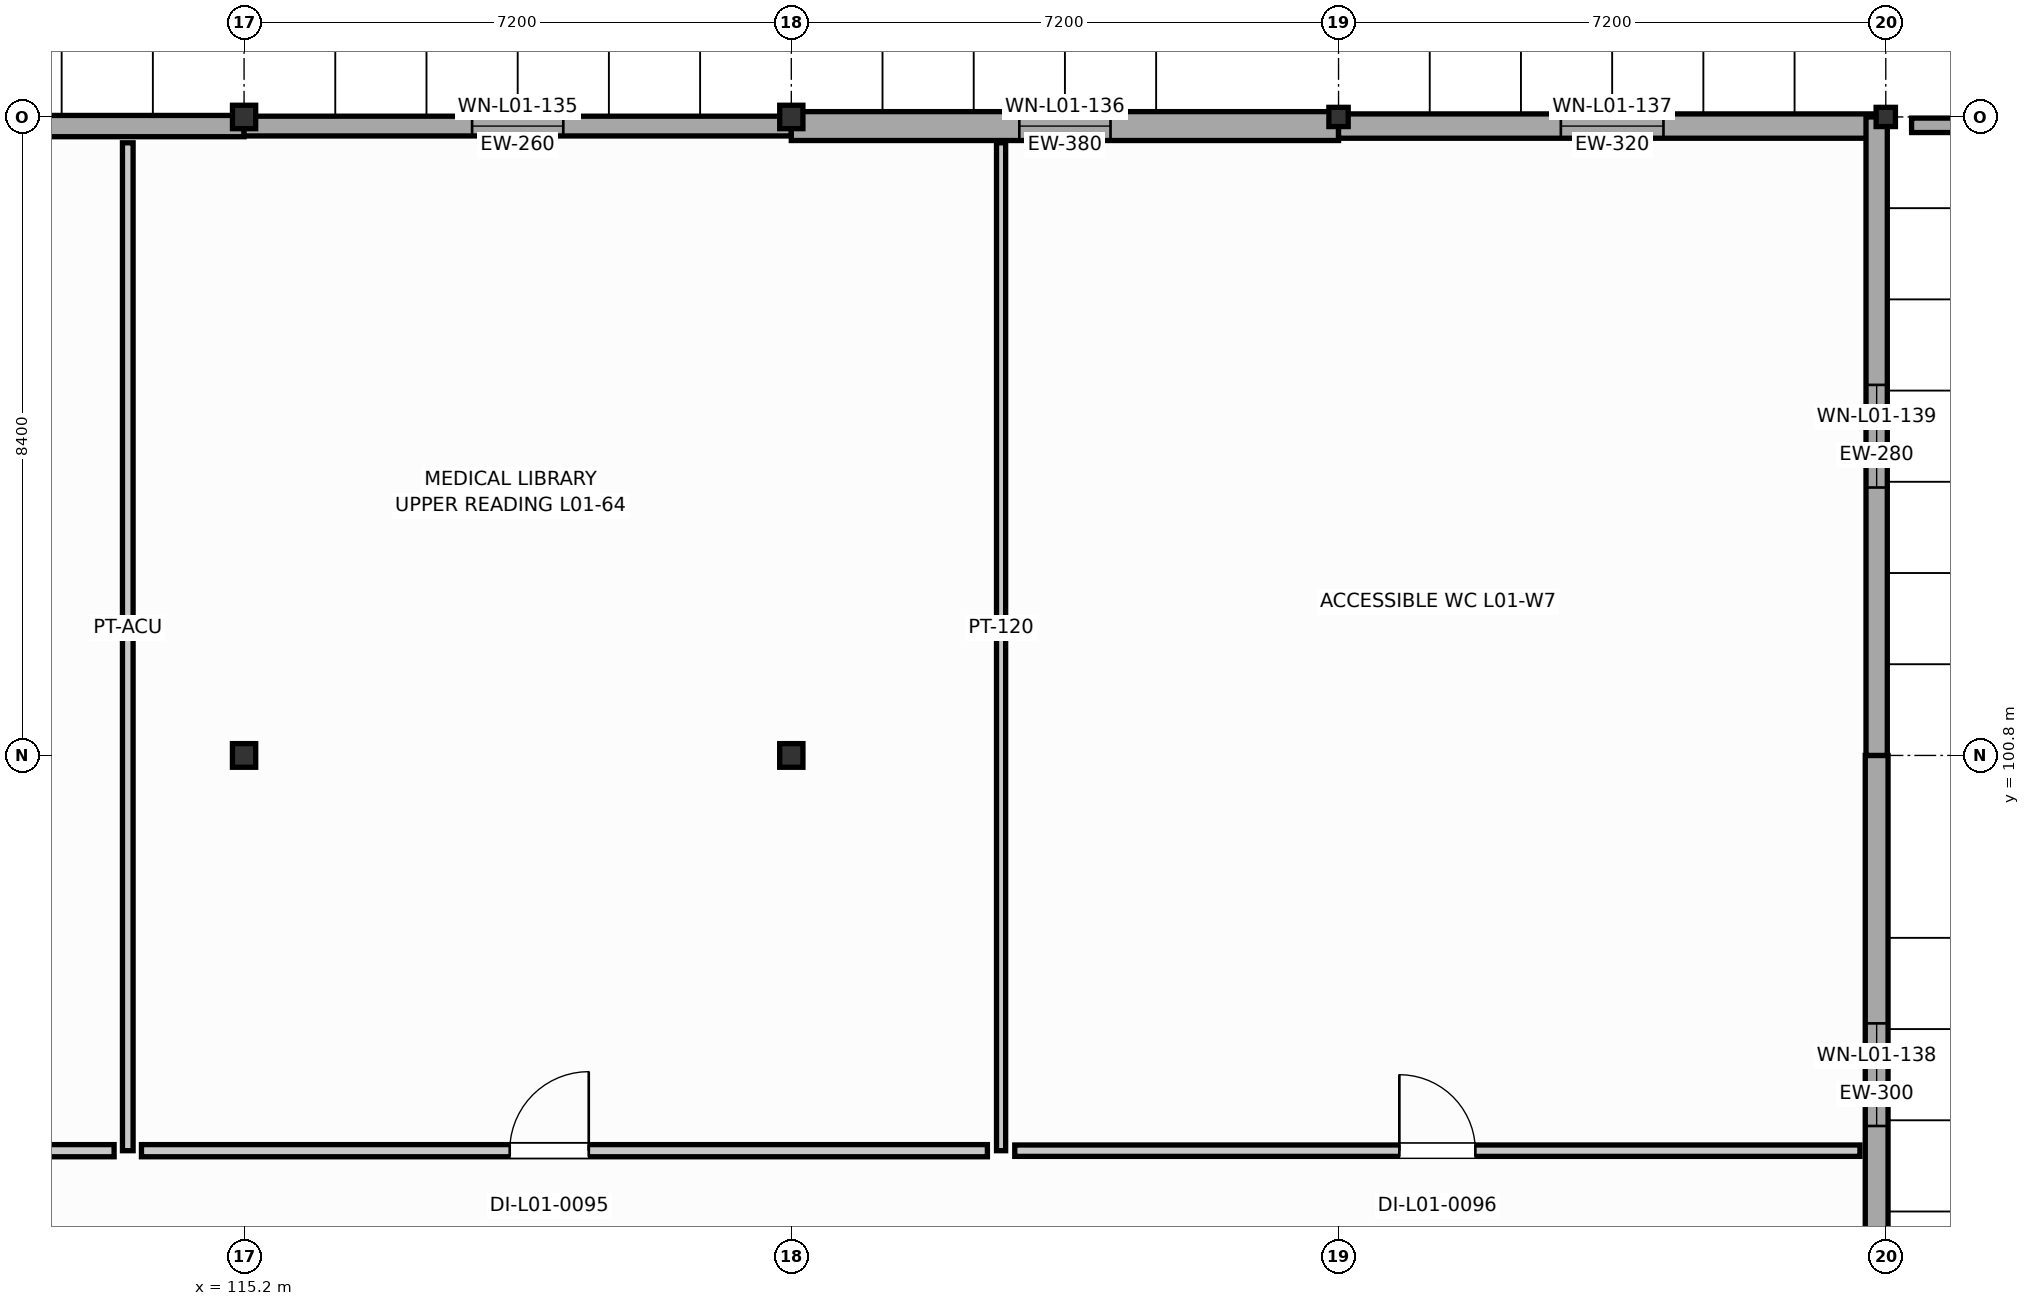
"""IFC4 building model, lengths in metres.
Left out: names, types, materials, properties, quantities, classifications, styles, units other than length and angle.
Written with IfcOpenShell. Run it as: python <this file> out.ifc"""

import sys

from ifc_helpers import new_model, si_unit, direction, frame, frame_2d, origin, origin_2d, place, context, subcontext, project, spatial, rectangle, i_section, extrude, element, fill, save


model = new_model("IFC4")
c1 = context("Model", 3, precision=1e-05, world=origin(), true_north=direction((0.0, 1.0)))
c2 = subcontext(c1, "Body", "Model", "MODEL_VIEW")
j1 = project(units=[si_unit("LENGTHUNIT", "METRE"), si_unit("PLANEANGLEUNIT", "RADIAN")], contexts=[c1])
p1 = place(None, origin())
s1 = spatial("IfcSite", under=j1, at=p1, CompositionType="ELEMENT")
p2 = place(p1, origin())
s2 = spatial("IfcBuilding", under=s1, at=p2, CompositionType="ELEMENT")
p3 = place(p2, frame((0.0, 0.0, 4.8)))
s3 = spatial("IfcBuildingStorey", under=s2, at=p3, CompositionType="ELEMENT", Elevation=4.8)
p4 = place(p3, frame((115.2, 100.8, 0.0), z_axis=(0.0, 0.0, 1.0), x_axis=(1.0, 0.0, 0.0)))
e1 = element("IfcColumn", 1, at=p4, inside=s3, PredefinedType="COLUMN", context=c2, shape_type="SweptSolid", body=[
    extrude(i_section(OverallWidth=0.306, OverallDepth=0.311, WebThickness=0.011, FlangeThickness=0.017, FilletRadius=0.015, at=origin_2d()), origin(), (0.0, 0.0, 1.0), 4.2),
])
p5 = place(p3, frame((115.2, 109.2, 0.0), z_axis=(0.0, 0.0, 1.0), x_axis=(1.0, 0.0, 0.0)))
e2 = element("IfcColumn", 2, at=p5, inside=s3, PredefinedType="COLUMN", context=c2, shape_type="SweptSolid", body=[
    extrude(i_section(OverallWidth=0.305, OverallDepth=0.308, WebThickness=0.01, FlangeThickness=0.015, FilletRadius=0.015, at=origin_2d()), origin(), (0.0, 0.0, 1.0), 4.2),
])
p6 = place(p3, frame((122.4, 100.8, 0.0), z_axis=(0.0, 0.0, 1.0), x_axis=(1.0, 0.0, 0.0)))
e3 = element("IfcColumn", 3, at=p6, inside=s3, PredefinedType="COLUMN", context=c2, shape_type="SweptSolid", body=[
    extrude(i_section(OverallWidth=0.306, OverallDepth=0.311, WebThickness=0.011, FlangeThickness=0.017, FilletRadius=0.015, at=origin_2d()), origin(), (0.0, 0.0, 1.0), 4.2),
])
p7 = place(p3, frame((122.4, 109.2, 0.0), z_axis=(0.0, 0.0, 1.0), x_axis=(1.0, 0.0, 0.0)))
e4 = element("IfcColumn", 4, at=p7, inside=s3, PredefinedType="COLUMN", context=c2, shape_type="SweptSolid", body=[
    extrude(i_section(OverallWidth=0.305, OverallDepth=0.308, WebThickness=0.01, FlangeThickness=0.015, FilletRadius=0.015, at=origin_2d()), origin(), (0.0, 0.0, 1.0), 4.2),
])
for number, where, z_axis, x_axis in (
    (5, (129.6, 109.2, 0.0), (0.0, 0.0, 1.0), (1.0, 0.0, 0.0)),
    (6, (136.8, 109.2, 0.0), (0.0, 0.0, 1.0), (1.0, 0.0, 0.0)),
):
    element("IfcColumn", number, at=place(p3, frame(where, z_axis=z_axis, x_axis=x_axis)), inside=s3, PredefinedType="COLUMN", context=c2, shape_type="SweptSolid", body=[
        extrude(i_section(OverallWidth=0.254, OverallDepth=0.253, WebThickness=0.009, FlangeThickness=0.014, FilletRadius=0.013, at=origin_2d()), origin(), (0.0, 0.0, 1.0), 4.2),
    ])
p8 = place(p3, frame((108.0, 109.08, 0.0), z_axis=(0.0, 0.0, 1.0), x_axis=(1.0, 0.0, 0.0)))
e7 = element("IfcWall", 7, at=p8, inside=s3, PredefinedType="SOLIDWALL", context=c2, shape_type="SweptSolid", body=[
    extrude(rectangle(XDim=7.2, YDim=0.28, at=frame_2d((3.6, 0.0))), origin(), (0.0, 0.0, 1.0), 3.482),
])
p9 = place(p8, frame((3.0, 0.0, 0.95)))
e8 = element("IfcOpeningElement", 8, at=p9, cuts=e7, PredefinedType="OPENING", context=c2, shape_type="SweptSolid", body=[
    extrude(rectangle(XDim=1.2, YDim=1.35, at=frame_2d((0.6, 0.675))), frame((0.0, 0.15, 0.0), z_axis=(0.0, -1.0, 0.0), x_axis=(1.0, 0.0, 0.0)), (0.0, 0.0, 1.0), 0.3),
])
p10 = place(p3, frame((115.2, 109.08, 0.0), z_axis=(0.0, 0.0, 1.0), x_axis=(1.0, 0.0, 0.0)))
e9 = element("IfcWall", 9, at=p10, inside=s3, PredefinedType="SOLIDWALL", context=c2, shape_type="SweptSolid", body=[
    extrude(rectangle(XDim=7.2, YDim=0.26, at=frame_2d((3.6, 0.0))), origin(), (0.0, 0.0, 1.0), 3.482),
])
p11 = place(p10, frame((3.0, 0.0, 0.95)))
e10 = element("IfcOpeningElement", 10, at=p11, cuts=e9, PredefinedType="OPENING", context=c2, shape_type="SweptSolid", body=[
    extrude(rectangle(XDim=1.2, YDim=1.55, at=frame_2d((0.6, 0.775))), frame((0.0, 0.14, 0.0), z_axis=(0.0, -1.0, 0.0), x_axis=(1.0, 0.0, 0.0)), (0.0, 0.0, 1.0), 0.28),
])
p12 = place(p3, frame((122.4, 109.08, 0.0), z_axis=(0.0, 0.0, 1.0), x_axis=(1.0, 0.0, 0.0)))
e11 = element("IfcWall", 11, at=p12, inside=s3, PredefinedType="SOLIDWALL", context=c2, shape_type="SweptSolid", body=[
    extrude(rectangle(XDim=7.2, YDim=0.38, at=frame_2d((3.6, 0.0))), origin(), (0.0, 0.0, 1.0), 3.482),
])
p13 = place(p12, frame((3.0, 0.0, 0.95)))
e12 = element("IfcOpeningElement", 12, at=p13, cuts=e11, PredefinedType="OPENING", context=c2, shape_type="SweptSolid", body=[
    extrude(rectangle(XDim=1.2, YDim=1.75, at=frame_2d((0.6, 0.875))), frame((0.0, 0.2, 0.0), z_axis=(0.0, -1.0, 0.0), x_axis=(1.0, 0.0, 0.0)), (0.0, 0.0, 1.0), 0.4),
])
p14 = place(p3, frame((129.6, 109.08, 0.0), z_axis=(0.0, 0.0, 1.0), x_axis=(1.0, 0.0, 0.0)))
e13 = element("IfcWall", 13, at=p14, inside=s3, PredefinedType="SOLIDWALL", context=c2, shape_type="SweptSolid", body=[
    extrude(rectangle(XDim=7.2, YDim=0.32, at=frame_2d((3.6, 0.0))), origin(), (0.0, 0.0, 1.0), 3.482),
])
p15 = place(p14, frame((2.925, 0.0, 0.95)))
e14 = element("IfcOpeningElement", 14, at=p15, cuts=e13, PredefinedType="OPENING", context=c2, shape_type="SweptSolid", body=[
    extrude(rectangle(XDim=1.35, YDim=1.15, at=frame_2d((0.675, 0.575))), frame((0.0, 0.17, 0.0), z_axis=(0.0, -1.0, 0.0), x_axis=(1.0, 0.0, 0.0)), (0.0, 0.0, 1.0), 0.34),
])
p16 = place(p3, frame((136.68, 92.4, 0.0), z_axis=(0.0, 0.0, 1.0), x_axis=(0.0, 1.0, 0.0)))
e15 = element("IfcWall", 15, at=p16, inside=s3, PredefinedType="SOLIDWALL", context=c2, shape_type="SweptSolid", body=[
    extrude(rectangle(XDim=8.4, YDim=0.3, at=frame_2d((4.2, 0.0))), origin(), (0.0, 0.0, 1.0), 3.015),
])
p17 = place(p16, frame((3.525, 0.0, 0.95)))
e16 = element("IfcOpeningElement", 16, at=p17, cuts=e15, PredefinedType="OPENING", context=c2, shape_type="SweptSolid", body=[
    extrude(rectangle(XDim=1.35, YDim=1.35, at=frame_2d((0.675, 0.675))), frame((0.0, 0.16, 0.0), z_axis=(0.0, -1.0, 0.0), x_axis=(1.0, 0.0, 0.0)), (0.0, 0.0, 1.0), 0.32),
])
p18 = place(p3, frame((136.68, 100.8, 0.0), z_axis=(0.0, 0.0, 1.0), x_axis=(0.0, 1.0, 0.0)))
e17 = element("IfcWall", 17, at=p18, inside=s3, PredefinedType="SOLIDWALL", context=c2, shape_type="SweptSolid", body=[
    extrude(rectangle(XDim=8.4, YDim=0.28, at=frame_2d((4.2, 0.0))), origin(), (0.0, 0.0, 1.0), 3.015),
])
p19 = place(p18, frame((3.525, 0.0, 0.95)))
e18 = element("IfcOpeningElement", 18, at=p19, cuts=e17, PredefinedType="OPENING", context=c2, shape_type="SweptSolid", body=[
    extrude(rectangle(XDim=1.35, YDim=1.55, at=frame_2d((0.675, 0.775))), frame((0.0, 0.15, 0.0), z_axis=(0.0, -1.0, 0.0), x_axis=(1.0, 0.0, 0.0)), (0.0, 0.0, 1.0), 0.3),
])
p20 = place(p3, frame((137.139, 109.09, 0.0), z_axis=(0.0, 0.0, 1.0), x_axis=(1.0, 0.0, 0.0)))
e19 = element("IfcWall", 19, at=p20, inside=s3, PredefinedType="PARAPET", context=c2, shape_type="SweptSolid", body=[
    extrude(rectangle(XDim=6.583, YDim=0.19, at=frame_2d((3.292, 0.0))), origin(), (0.0, 0.0, 1.0), 1.15),
])
p21 = place(p3, frame((113.67, 108.86, 0.0), z_axis=(0.0, 0.0, 1.0), x_axis=(0.0, -1.0, 0.0)))
e20 = element("IfcWall", 20, at=p21, inside=s3, PredefinedType="PARTITIONING", context=c2, shape_type="SweptSolid", body=[
    extrude(rectangle(XDim=13.26, YDim=0.14, at=frame_2d((6.63, 0.0))), origin(), (0.0, 0.0, 1.0), 3.328),
])
p22 = place(p3, frame((113.49, 95.6, 0.0), z_axis=(0.0, 0.0, 1.0), x_axis=(-1.0, 0.0, 0.0)))
e21 = element("IfcWall", 21, at=p22, inside=s3, PredefinedType="PARTITIONING", context=c2, shape_type="SweptSolid", body=[
    extrude(rectangle(XDim=11.13, YDim=0.16, at=frame_2d((5.565, 0.0))), origin(), (0.0, 0.0, 1.0), 3.328),
])
p23 = place(p22, frame((5.225, 0.0, 0.0)))
e22 = element("IfcOpeningElement", 22, at=p23, cuts=e21, PredefinedType="OPENING", context=c2, shape_type="SweptSolid", body=[
    extrude(rectangle(XDim=1.08, YDim=2.15, at=frame_2d((0.54, 1.075))), frame((0.0, 0.09, 0.0), z_axis=(0.0, -1.0, 0.0), x_axis=(1.0, 0.0, 0.0)), (0.0, 0.0, 1.0), 0.18),
])
p24 = place(p3, frame((125.16, 108.86, 0.0), z_axis=(0.0, 0.0, 1.0), x_axis=(0.0, -1.0, 0.0)))
e23 = element("IfcWall", 23, at=p24, inside=s3, PredefinedType="PARTITIONING", context=c2, shape_type="SweptSolid", body=[
    extrude(rectangle(XDim=13.26, YDim=0.12, at=frame_2d((6.63, 0.0))), origin(), (0.0, 0.0, 1.0), 3.945),
])
p25 = place(p3, frame((124.98, 95.6, 0.0), z_axis=(0.0, 0.0, 1.0), x_axis=(-1.0, 0.0, 0.0)))
e24 = element("IfcWall", 24, at=p25, inside=s3, PredefinedType="PARTITIONING", context=c2, shape_type="SweptSolid", body=[
    extrude(rectangle(XDim=11.13, YDim=0.16, at=frame_2d((5.565, 0.0))), origin(), (0.0, 0.0, 1.0), 3.408),
])
p26 = place(p25, frame((5.245, 0.0, 0.0)))
e25 = element("IfcOpeningElement", 25, at=p26, cuts=e24, PredefinedType="OPENING", context=c2, shape_type="SweptSolid", body=[
    extrude(rectangle(XDim=1.04, YDim=2.15, at=frame_2d((0.52, 1.075))), frame((0.0, 0.09, 0.0), z_axis=(0.0, -1.0, 0.0), x_axis=(1.0, 0.0, 0.0)), (0.0, 0.0, 1.0), 0.18),
])
p27 = place(p3, frame((136.46, 95.6, 0.0), z_axis=(0.0, 0.0, 1.0), x_axis=(-1.0, 0.0, 0.0)))
e26 = element("IfcWall", 26, at=p27, inside=s3, PredefinedType="PLUMBINGWALL", context=c2, shape_type="SweptSolid", body=[
    extrude(rectangle(XDim=11.12, YDim=0.15, at=frame_2d((5.56, 0.0))), origin(), (0.0, 0.0, 1.0), 3.018),
])
p28 = place(p27, frame((5.06, 0.0, 0.0)))
e27 = element("IfcOpeningElement", 27, at=p28, cuts=e26, PredefinedType="OPENING", context=c2, shape_type="SweptSolid", body=[
    extrude(rectangle(XDim=1.0, YDim=2.1, at=frame_2d((0.5, 1.05))), frame((0.0, 0.085, 0.0), z_axis=(0.0, -1.0, 0.0), x_axis=(1.0, 0.0, 0.0)), (0.0, 0.0, 1.0), 0.17),
])
p29 = place(p11, origin())
e28 = element("IfcWindow", 28, at=p29, inside=s3, PartitioningType="SINGLE_PANEL", PredefinedType="WINDOW", context=c2, shape_type="SweptSolid", body=[
    extrude(rectangle(XDim=1.2, YDim=1.55, at=frame_2d((0.6, 0.775))), frame((0.0, 0.03, 0.0), z_axis=(0.0, -1.0, 0.0), x_axis=(1.0, 0.0, 0.0)), (0.0, 0.0, 1.0), 0.06),
])
fill(e10, e28)
p30 = place(p13, origin())
e29 = element("IfcWindow", 29, at=p30, inside=s3, PartitioningType="SINGLE_PANEL", PredefinedType="WINDOW", context=c2, shape_type="SweptSolid", body=[
    extrude(rectangle(XDim=1.2, YDim=1.75, at=frame_2d((0.6, 0.875))), frame((0.0, 0.03, 0.0), z_axis=(0.0, -1.0, 0.0), x_axis=(1.0, 0.0, 0.0)), (0.0, 0.0, 1.0), 0.06),
])
fill(e12, e29)
p31 = place(p15, origin())
e30 = element("IfcWindow", 30, at=p31, inside=s3, PartitioningType="SINGLE_PANEL", PredefinedType="WINDOW", context=c2, shape_type="SweptSolid", body=[
    extrude(rectangle(XDim=1.35, YDim=1.15, at=frame_2d((0.675, 0.575))), frame((0.0, 0.03, 0.0), z_axis=(0.0, -1.0, 0.0), x_axis=(1.0, 0.0, 0.0)), (0.0, 0.0, 1.0), 0.06),
])
fill(e14, e30)
p32 = place(p17, origin())
e31 = element("IfcWindow", 31, at=p32, inside=s3, PartitioningType="SINGLE_PANEL", PredefinedType="WINDOW", context=c2, shape_type="SweptSolid", body=[
    extrude(rectangle(XDim=1.35, YDim=1.35, at=frame_2d((0.675, 0.675))), frame((0.0, 0.03, 0.0), z_axis=(0.0, -1.0, 0.0), x_axis=(1.0, 0.0, 0.0)), (0.0, 0.0, 1.0), 0.06),
])
fill(e16, e31)
p33 = place(p19, origin())
e32 = element("IfcWindow", 32, at=p33, inside=s3, PartitioningType="SINGLE_PANEL", PredefinedType="WINDOW", context=c2, shape_type="SweptSolid", body=[
    extrude(rectangle(XDim=1.35, YDim=1.55, at=frame_2d((0.675, 0.775))), frame((0.0, 0.03, 0.0), z_axis=(0.0, -1.0, 0.0), x_axis=(1.0, 0.0, 0.0)), (0.0, 0.0, 1.0), 0.06),
])
fill(e18, e32)
p34 = place(p26, frame((1.04, 0.0, 0.0), z_axis=(0.0, 0.0, 1.0), x_axis=(-1.0, 0.0, 0.0)))
e33 = element("IfcDoor", 33, at=p34, inside=s3, OperationType="SINGLE_SWING_RIGHT", PredefinedType="DOOR", context=c2, shape_type="SweptSolid", body=[
    extrude(rectangle(XDim=1.04, YDim=2.15, at=frame_2d((0.52, 1.075))), frame((0.0, 0.025, 0.0), z_axis=(0.0, -1.0, 0.0), x_axis=(1.0, 0.0, 0.0)), (0.0, 0.0, 1.0), 0.05),
])
fill(e25, e33)
p35 = place(p28, frame((1.0, 0.0, 0.0), z_axis=(0.0, 0.0, 1.0), x_axis=(-1.0, 0.0, 0.0)))
e34 = element("IfcDoor", 34, at=p35, inside=s3, OperationType="SINGLE_SWING_LEFT", PredefinedType="DOOR", context=c2, shape_type="SweptSolid", body=[
    extrude(rectangle(XDim=1.0, YDim=2.1, at=frame_2d((0.5, 1.05))), frame((0.0, 0.025, 0.0), z_axis=(0.0, -1.0, 0.0), x_axis=(1.0, 0.0, 0.0)), (0.0, 0.0, 1.0), 0.05),
])
fill(e27, e34)
save(model, sys.argv[1])
